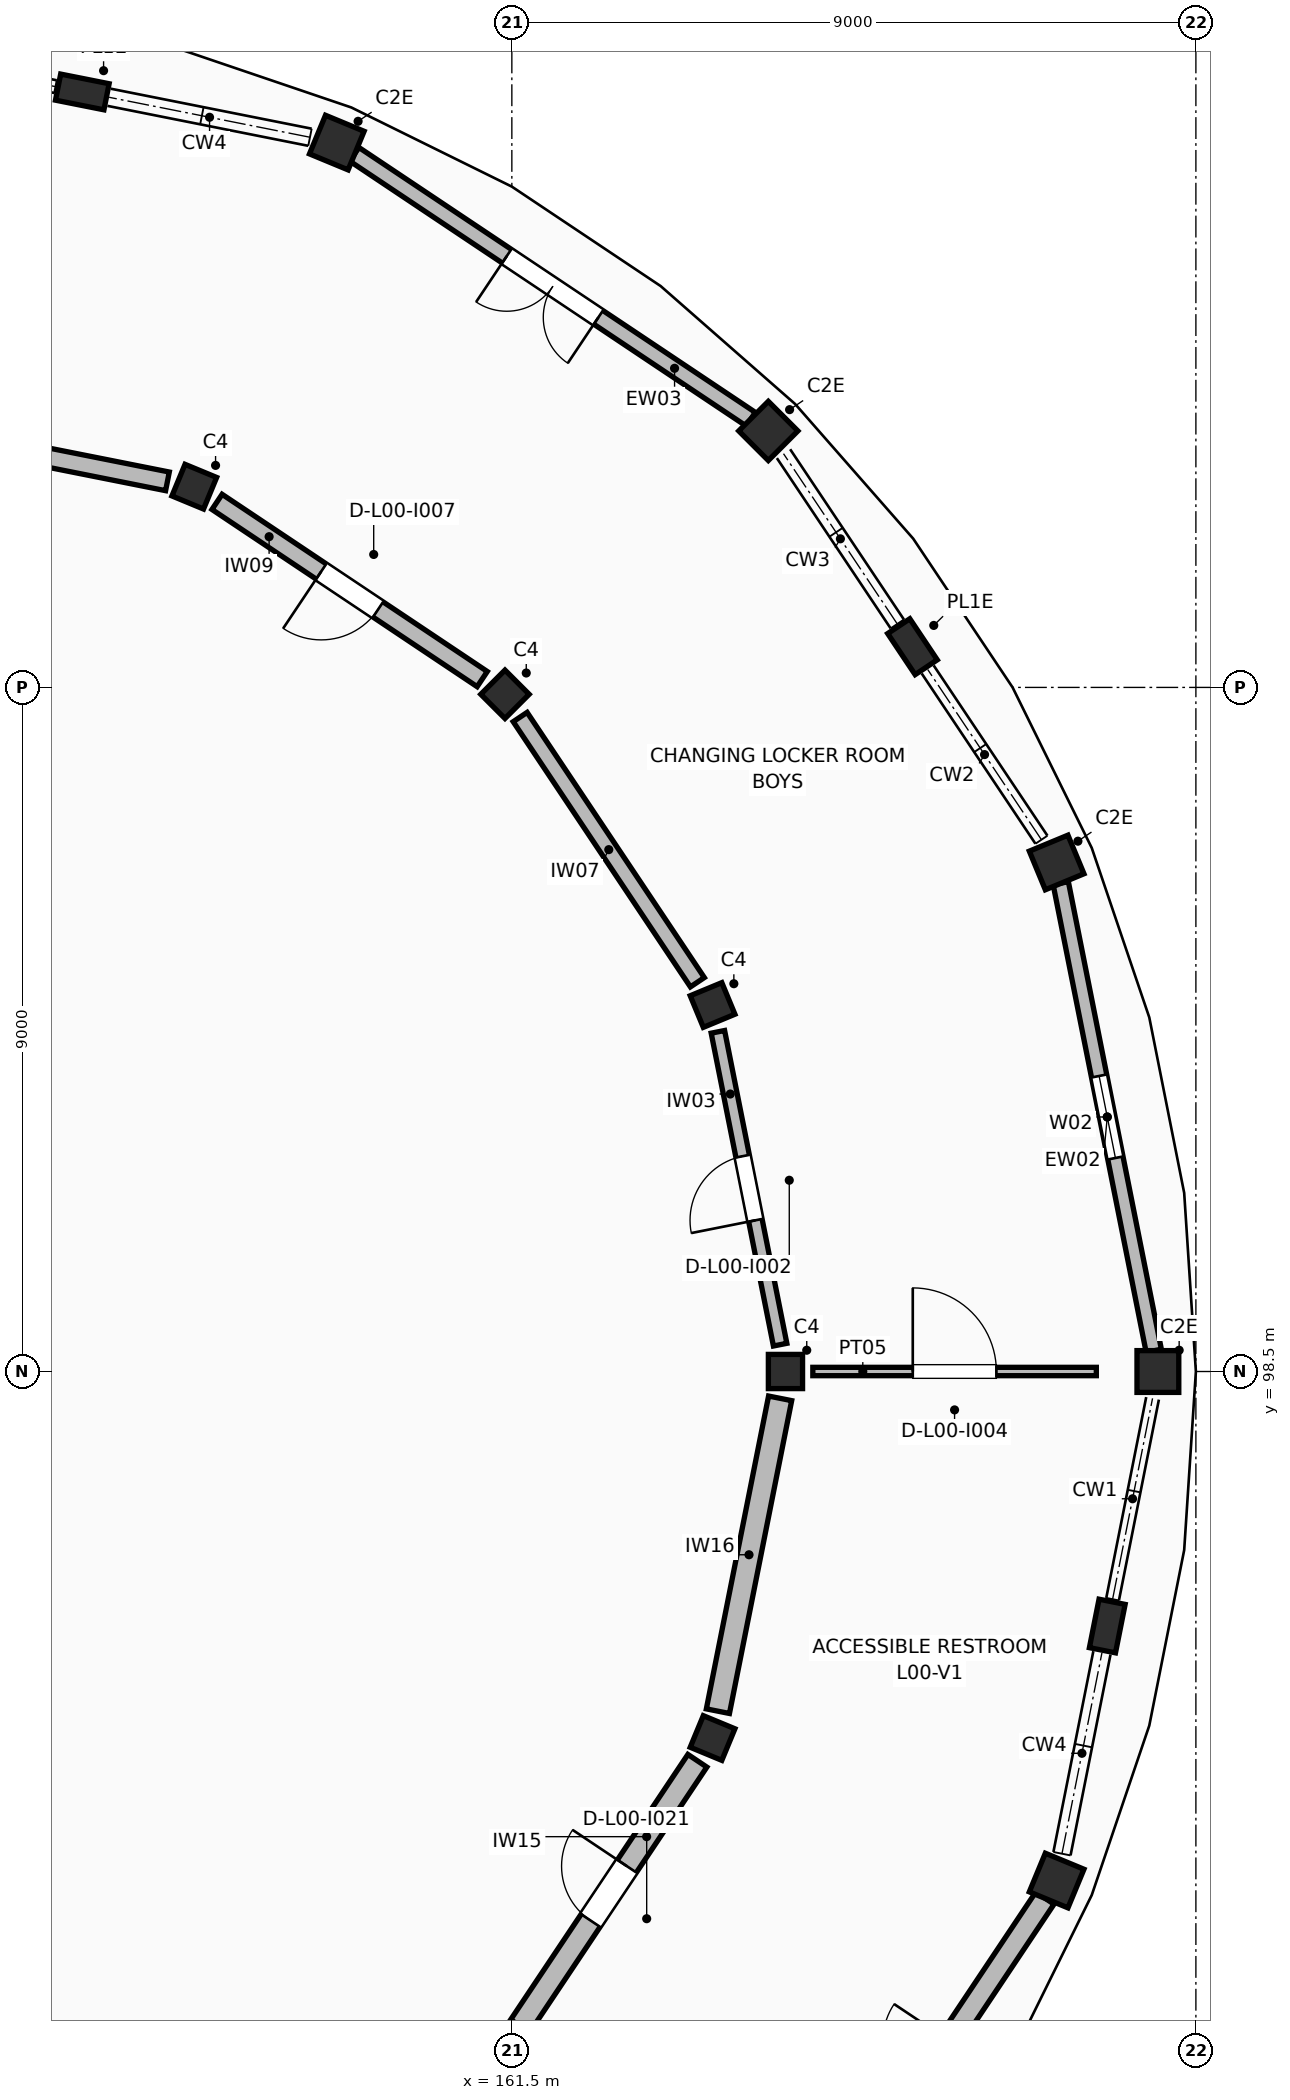
"""IFC4 building model, lengths in metres.
Left out: names, types, materials, properties, quantities, classifications, styles, units other than length and angle.
Written with IfcOpenShell. Run it as: python <this file> out.ifc"""

import sys

from ifc_helpers import new_model, si_unit, direction, frame, frame_2d, origin, origin_2d, place, context, subcontext, project, spatial, rectangle, extrude, element, fill, save


model = new_model("IFC4")
c1 = context("Model", 3, precision=1e-05, world=origin(), true_north=direction((0.0, 1.0)))
c2 = subcontext(c1, "Body", "Model", "MODEL_VIEW")
j1 = project(units=[si_unit("LENGTHUNIT", "METRE"), si_unit("PLANEANGLEUNIT", "RADIAN")], contexts=[c1])
p1 = place(None, origin())
s1 = spatial("IfcSite", under=j1, at=p1, CompositionType="ELEMENT")
p2 = place(p1, origin())
s2 = spatial("IfcBuilding", under=s1, at=p2, CompositionType="ELEMENT")
p3 = place(p2, origin())
s3 = spatial("IfcBuildingStorey", under=s2, at=p3, CompositionType="ELEMENT", Elevation=0.0)
p4 = place(p3, frame((165.1, 98.5, 0.0), z_axis=(0.0, 0.0, 1.0), x_axis=(1.0, 0.0, 0.0)))
e1 = element("IfcColumn", 1, at=p4, inside=s3, PredefinedType="COLUMN", context=c2, shape_type="SweptSolid", body=[
    extrude(rectangle(XDim=0.45, YDim=0.45, at=origin_2d()), origin(), (0.0, 0.0, 1.0), 4.42),
])
p5 = place(p3, frame((170.0, 98.5, 0.0), z_axis=(0.0, 0.0, 1.0), x_axis=(1.0, 0.0, 0.0)))
e2 = element("IfcColumn", 2, at=p5, inside=s3, PredefinedType="COLUMN", context=c2, shape_type="SweptSolid", body=[
    extrude(rectangle(XDim=0.55, YDim=0.55, at=origin_2d()), origin(), (0.0, 0.0, 1.0), 4.42),
])
p6 = place(p3, frame((164.141, 103.322, 0.0), z_axis=(0.0, 0.0, 1.0), x_axis=(0.923879532511, 0.382683432365, 0.0)))
e3 = element("IfcColumn", 3, at=p6, inside=s3, PredefinedType="COLUMN", context=c2, shape_type="SweptSolid", body=[
    extrude(rectangle(XDim=0.45, YDim=0.45, at=origin_2d()), origin(), (0.0, 0.0, 1.0), 4.42),
])
p7 = place(p3, frame((168.668, 105.197, 0.0), z_axis=(0.0, 0.0, 1.0), x_axis=(0.923879532511, 0.382683432365, 0.0)))
e4 = element("IfcColumn", 4, at=p7, inside=s3, PredefinedType="COLUMN", context=c2, shape_type="SweptSolid", body=[
    extrude(rectangle(XDim=0.55, YDim=0.55, at=origin_2d()), origin(), (0.0, 0.0, 1.0), 4.42),
])
p8 = place(p3, frame((161.409, 107.409, 0.0), z_axis=(0.0, 0.0, 1.0), x_axis=(0.707106781187, 0.707106781187, 0.0)))
e5 = element("IfcColumn", 5, at=p8, inside=s3, PredefinedType="COLUMN", context=c2, shape_type="SweptSolid", body=[
    extrude(rectangle(XDim=0.45, YDim=0.45, at=origin_2d()), origin(), (0.0, 0.0, 1.0), 4.42),
])
p9 = place(p3, frame((164.874, 110.874, 0.0), z_axis=(0.0, 0.0, 1.0), x_axis=(0.707106781187, 0.707106781187, 0.0)))
e6 = element("IfcColumn", 6, at=p9, inside=s3, PredefinedType="COLUMN", context=c2, shape_type="SweptSolid", body=[
    extrude(rectangle(XDim=0.55, YDim=0.55, at=origin_2d()), origin(), (0.0, 0.0, 1.0), 4.42),
])
p10 = place(p3, frame((157.322, 110.141, 0.0), z_axis=(0.0, 0.0, 1.0), x_axis=(0.382683432365, 0.923879532511, 0.0)))
e7 = element("IfcColumn", 7, at=p10, inside=s3, PredefinedType="COLUMN", context=c2, shape_type="SweptSolid", body=[
    extrude(rectangle(XDim=0.45, YDim=0.45, at=origin_2d()), origin(), (0.0, 0.0, 1.0), 4.42),
])
p11 = place(p3, frame((159.197, 114.668, 0.0), z_axis=(0.0, 0.0, 1.0), x_axis=(0.382683432365, 0.923879532511, 0.0)))
e8 = element("IfcColumn", 8, at=p11, inside=s3, PredefinedType="COLUMN", context=c2, shape_type="SweptSolid", body=[
    extrude(rectangle(XDim=0.55, YDim=0.55, at=origin_2d()), origin(), (0.0, 0.0, 1.0), 4.42),
])
p12 = place(p3, frame((164.141, 93.678, 0.0), z_axis=(0.0, 0.0, 1.0), x_axis=(0.923879532511, -0.382683432365, 0.0)))
e9 = element("IfcColumn", 9, at=p12, inside=s3, PredefinedType="COLUMN", context=c2, shape_type="SweptSolid", body=[
    extrude(rectangle(XDim=0.45, YDim=0.45, at=origin_2d()), origin(), (0.0, 0.0, 1.0), 4.42),
])
p13 = place(p3, frame((168.668, 91.803, 0.0), z_axis=(0.0, 0.0, 1.0), x_axis=(0.923879532511, -0.382683432365, 0.0)))
e10 = element("IfcColumn", 10, at=p13, inside=s3, PredefinedType="COLUMN", context=c2, shape_type="SweptSolid", body=[
    extrude(rectangle(XDim=0.55, YDim=0.55, at=origin_2d()), origin(), (0.0, 0.0, 1.0), 4.42),
])
for number, where, z_axis, x_axis in (
    (11, (166.771, 108.036, 0.0), (0.0, 0.0, 1.0), (0.831, 0.556, 0.0)),
    (12, (155.848, 115.334, 0.0), (0.0, 0.0, 1.0), (0.195, 0.981, 0.0)),
    (13, (169.334, 95.152, 0.0), (0.0, 0.0, 1.0), (0.981, -0.195, 0.0)),
):
    element("IfcColumn", number, at=place(p3, frame(where, z_axis=z_axis, x_axis=x_axis)), inside=s3, PredefinedType="PILASTER", context=c2, shape_type="SweptSolid", body=[
        extrude(rectangle(XDim=0.35, YDim=0.65, at=origin_2d()), origin(), (0.0, 0.0, 1.0), 4.42),
    ])
p14 = place(p3, frame((169.946, 98.773, 0.0), z_axis=(0.0, 0.0, 1.0), x_axis=(-0.195090512195, 0.980785242574, 0.0)))
e14 = element("IfcWall", 14, at=p14, inside=s3, PredefinedType="STANDARD", context=c2, shape_type="SweptSolid", body=[
    extrude(rectangle(XDim=6.272, YDim=0.204, at=frame_2d((3.136, 0.0))), origin(), (0.0, 0.0, 1.0), 3.4),
])
p15 = place(p14, frame((2.586, 0.0, 0.95)))
e15 = element("IfcOpeningElement", 15, at=p15, cuts=e14, PredefinedType="OPENING", context=c2, shape_type="SweptSolid", body=[
    extrude(rectangle(XDim=1.1, YDim=1.3, at=frame_2d((0.55, 0.65))), frame((0.0, 0.112, 0.0), z_axis=(0.0, -1.0, 0.0), x_axis=(1.0, 0.0, 0.0)), (0.0, 0.0, 1.0), 0.224),
])
p16 = place(p3, frame((164.643, 111.029, 0.0), z_axis=(0.0, 0.0, 1.0), x_axis=(-0.831468962917, 0.555571204893, 0.0)))
e16 = element("IfcWall", 16, at=p16, inside=s3, PredefinedType="STANDARD", context=c2, shape_type="SweptSolid", body=[
    extrude(rectangle(XDim=6.272, YDim=0.216, at=frame_2d((3.136, 0.0))), origin(), (0.0, 0.0, 1.0), 3.4),
])
p17 = place(p16, frame((2.411, 0.0, 0.0)))
e17 = element("IfcOpeningElement", 17, at=p17, cuts=e16, PredefinedType="OPENING", context=c2, shape_type="SweptSolid", body=[
    extrude(rectangle(XDim=1.45, YDim=2.22, at=frame_2d((0.725, 1.11))), frame((0.0, 0.118, 0.0), z_axis=(0.0, -1.0, 0.0), x_axis=(1.0, 0.0, 0.0)), (0.0, 0.0, 1.0), 0.236),
])
p18 = place(p3, frame((165.029, 86.357, 0.0), z_axis=(0.0, 0.0, 1.0), x_axis=(0.555571204893, 0.831468962917, 0.0)))
e18 = element("IfcWall", 18, at=p18, inside=s3, PredefinedType="STANDARD", context=c2, shape_type="SweptSolid", body=[
    extrude(rectangle(XDim=6.272, YDim=0.288, at=frame_2d((3.136, 0.0))), origin(), (0.0, 0.0, 1.0), 3.4),
])
p19 = place(p18, frame((2.261, 0.0, 0.0)))
e19 = element("IfcOpeningElement", 19, at=p19, cuts=e18, PredefinedType="OPENING", context=c2, shape_type="SweptSolid", body=[
    extrude(rectangle(XDim=1.75, YDim=2.25, at=frame_2d((0.875, 1.125))), frame((0.0, 0.154, 0.0), z_axis=(0.0, -1.0, 0.0), x_axis=(1.0, 0.0, 0.0)), (0.0, 0.0, 1.0), 0.308),
])
p20 = place(p3, frame((165.03, 98.853, 0.0), z_axis=(0.0, 0.0, 1.0), x_axis=(-0.195075508639, 0.980788226851, 0.0)))
e20 = element("IfcWall", 20, at=p20, inside=s3, PredefinedType="STANDARD", context=c2, shape_type="SweptSolid", body=[
    extrude(rectangle(XDim=4.196, YDim=0.18, at=frame_2d((2.098, 0.0))), origin(), (0.0, 0.0, 1.0), 3.38),
])
p21 = place(p20, frame((1.668, 0.0, 0.0)))
e21 = element("IfcOpeningElement", 21, at=p21, cuts=e20, PredefinedType="OPENING", context=c2, shape_type="SweptSolid", body=[
    extrude(rectangle(XDim=0.86, YDim=2.18, at=frame_2d((0.43, 1.09))), frame((0.0, 0.1, 0.0), z_axis=(0.0, -1.0, 0.0), x_axis=(1.0, 0.0, 0.0)), (0.0, 0.0, 1.0), 0.2),
])
p22 = place(p3, frame((165.46, 98.5, 0.0), z_axis=(0.0, 0.0, 1.0), x_axis=(1.0, 0.0, 0.0)))
e22 = element("IfcWall", 22, at=p22, inside=s3, PredefinedType="PARTITIONING", context=c2, shape_type="SweptSolid", body=[
    extrude(rectangle(XDim=3.73, YDim=0.11, at=frame_2d((1.865, 0.0))), origin(), (0.0, 0.0, 1.0), 3.38),
])
p23 = place(p22, frame((1.315, 0.0, 0.0)))
e23 = element("IfcOpeningElement", 23, at=p23, cuts=e22, PredefinedType="OPENING", context=c2, shape_type="SweptSolid", body=[
    extrude(rectangle(XDim=1.1, YDim=2.06, at=frame_2d((0.55, 1.03))), frame((0.0, 0.065, 0.0), z_axis=(0.0, -1.0, 0.0), x_axis=(1.0, 0.0, 0.0)), (0.0, 0.0, 1.0), 0.13),
])
p24 = place(p3, frame((163.941, 103.621, 0.0), z_axis=(0.0, 0.0, 1.0), x_axis=(-0.55557260962, 0.831468024304, 0.0)))
e24 = element("IfcWall", 24, at=p24, inside=s3, PredefinedType="STANDARD", context=c2, shape_type="SweptSolid", body=[
    extrude(rectangle(XDim=4.196, YDim=0.22, at=frame_2d((2.098, 0.0))), origin(), (0.0, 0.0, 1.0), 3.38),
])
p25 = place(p3, frame((161.11, 107.61, 0.0), z_axis=(0.0, 0.0, 1.0), x_axis=(-0.831468024304, 0.55557260962, 0.0)))
e25 = element("IfcWall", 25, at=p25, inside=s3, PredefinedType="STANDARD", context=c2, shape_type="SweptSolid", body=[
    extrude(rectangle(XDim=4.196, YDim=0.24, at=frame_2d((2.098, 0.0))), origin(), (0.0, 0.0, 1.0), 3.38),
])
p26 = place(p25, frame((1.648, 0.0, 0.0)))
e26 = element("IfcOpeningElement", 26, at=p26, cuts=e25, PredefinedType="OPENING", context=c2, shape_type="SweptSolid", body=[
    extrude(rectangle(XDim=0.9, YDim=2.24, at=frame_2d((0.45, 1.12))), frame((0.0, 0.13, 0.0), z_axis=(0.0, -1.0, 0.0), x_axis=(1.0, 0.0, 0.0)), (0.0, 0.0, 1.0), 0.26),
])
p27 = place(p3, frame((156.969, 110.211, 0.0), z_axis=(0.0, 0.0, 1.0), x_axis=(-0.980788226851, 0.195075508639, 0.0)))
e27 = element("IfcWall", 27, at=p27, inside=s3, PredefinedType="STANDARD", context=c2, shape_type="SweptSolid", body=[
    extrude(rectangle(XDim=4.196, YDim=0.25, at=frame_2d((2.098, 0.0))), origin(), (0.0, 0.0, 1.0), 3.38),
])
p28 = place(p3, frame((161.61, 89.89, 0.0), z_axis=(0.0, 0.0, 1.0), x_axis=(0.55557260962, 0.831468024304, 0.0)))
e28 = element("IfcWall", 28, at=p28, inside=s3, PredefinedType="STANDARD", context=c2, shape_type="SweptSolid", body=[
    extrude(rectangle(XDim=4.196, YDim=0.3, at=frame_2d((2.098, 0.0))), origin(), (0.0, 0.0, 1.0), 3.38),
])
p29 = place(p28, frame((1.668, 0.0, 0.0)))
e29 = element("IfcOpeningElement", 29, at=p29, cuts=e28, PredefinedType="OPENING", context=c2, shape_type="SweptSolid", body=[
    extrude(rectangle(XDim=0.86, YDim=2.12, at=frame_2d((0.43, 1.06))), frame((0.0, 0.16, 0.0), z_axis=(0.0, -1.0, 0.0), x_axis=(1.0, 0.0, 0.0)), (0.0, 0.0, 1.0), 0.32),
])
p30 = place(p3, frame((164.211, 94.031, 0.0), z_axis=(0.0, 0.0, 1.0), x_axis=(0.195075508639, 0.980788226851, 0.0)))
e30 = element("IfcWall", 30, at=p30, inside=s3, PredefinedType="STANDARD", context=c2, shape_type="SweptSolid", body=[
    extrude(rectangle(XDim=4.196, YDim=0.31, at=frame_2d((2.098, 0.0))), origin(), (0.0, 0.0, 1.0), 3.38),
])
p31 = place(p15, origin())
e31 = element("IfcWindow", 31, at=p31, inside=s3, PartitioningType="SINGLE_PANEL", PredefinedType="WINDOW", context=c2, shape_type="SweptSolid", body=[
    extrude(rectangle(XDim=1.1, YDim=1.3, at=frame_2d((0.55, 0.65))), frame((0.0, 0.03, 0.0), z_axis=(0.0, -1.0, 0.0), x_axis=(1.0, 0.0, 0.0)), (0.0, 0.0, 1.0), 0.06),
])
fill(e15, e31)
p32 = place(p17, frame((1.45, 0.0, 0.0), z_axis=(0.0, 0.0, 1.0), x_axis=(-1.0, 0.0, 0.0)))
e32 = element("IfcDoor", 32, at=p32, inside=s3, OperationType="DOUBLE_DOOR_SINGLE_SWING", PredefinedType="DOOR", context=c2, shape_type="SweptSolid", body=[
    extrude(rectangle(XDim=1.45, YDim=2.22, at=frame_2d((0.725, 1.11))), frame((0.0, 0.025, 0.0), z_axis=(0.0, -1.0, 0.0), x_axis=(1.0, 0.0, 0.0)), (0.0, 0.0, 1.0), 0.05),
])
fill(e17, e32)
p33 = place(p21, frame((0.86, 0.0, 0.0), z_axis=(0.0, 0.0, 1.0), x_axis=(-1.0, 0.0, 0.0)))
e33 = element("IfcDoor", 33, at=p33, inside=s3, OperationType="SINGLE_SWING_LEFT", PredefinedType="DOOR", context=c2, shape_type="SweptSolid", body=[
    extrude(rectangle(XDim=0.86, YDim=2.18, at=frame_2d((0.43, 1.09))), frame((0.0, 0.025, 0.0), z_axis=(0.0, -1.0, 0.0), x_axis=(1.0, 0.0, 0.0)), (0.0, 0.0, 1.0), 0.05),
])
fill(e21, e33)
p34 = place(p23, origin())
e34 = element("IfcDoor", 34, at=p34, inside=s3, OperationType="SINGLE_SWING_LEFT", PredefinedType="DOOR", context=c2, shape_type="SweptSolid", body=[
    extrude(rectangle(XDim=1.1, YDim=2.06, at=frame_2d((0.55, 1.03))), frame((0.0, 0.025, 0.0), z_axis=(0.0, -1.0, 0.0), x_axis=(1.0, 0.0, 0.0)), (0.0, 0.0, 1.0), 0.05),
])
fill(e23, e34)
p35 = place(p26, frame((0.9, 0.0, 0.0), z_axis=(0.0, 0.0, 1.0), x_axis=(-1.0, 0.0, 0.0)))
e35 = element("IfcDoor", 35, at=p35, inside=s3, OperationType="SINGLE_SWING_RIGHT", PredefinedType="DOOR", context=c2, shape_type="SweptSolid", body=[
    extrude(rectangle(XDim=0.9, YDim=2.24, at=frame_2d((0.45, 1.12))), frame((0.0, 0.025, 0.0), z_axis=(0.0, -1.0, 0.0), x_axis=(1.0, 0.0, 0.0)), (0.0, 0.0, 1.0), 0.05),
])
fill(e26, e35)
p36 = place(p29, frame((0.86, 0.0, 0.0), z_axis=(0.0, 0.0, 1.0), x_axis=(-1.0, 0.0, 0.0)))
e36 = element("IfcDoor", 36, at=p36, inside=s3, OperationType="SINGLE_SWING_RIGHT", PredefinedType="DOOR", context=c2, shape_type="SweptSolid", body=[
    extrude(rectangle(XDim=0.86, YDim=2.12, at=frame_2d((0.43, 1.06))), frame((0.0, 0.025, 0.0), z_axis=(0.0, -1.0, 0.0), x_axis=(1.0, 0.0, 0.0)), (0.0, 0.0, 1.0), 0.05),
])
fill(e29, e36)
save(model, sys.argv[1])
